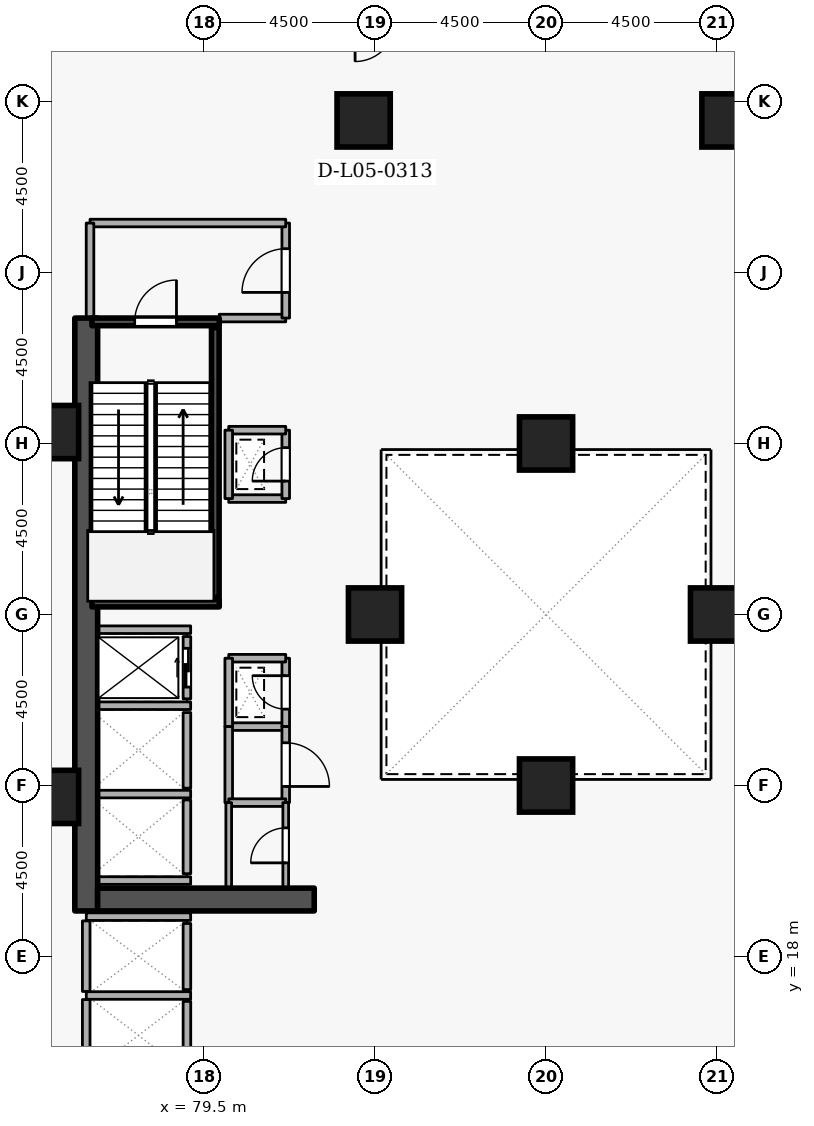
"""IFC4 building model, lengths in metres.
Left out: names, types, materials, properties, quantities, classifications, styles, units other than length and angle.
Written with IfcOpenShell. Run it as: python <this file> out.ifc"""

import sys

from ifc_helpers import new_model, si_unit, direction, frame, frame_2d, origin, origin_2d, place, context, subcontext, project, spatial, rectangle, extrude, element, fill, save


model = new_model("IFC4")
c1 = context("Model", 3, precision=1e-05, world=origin(), true_north=direction((0.0, 1.0)))
c2 = subcontext(c1, "Body", "Model", "MODEL_VIEW")
j1 = project(units=[si_unit("LENGTHUNIT", "METRE"), si_unit("PLANEANGLEUNIT", "RADIAN")], contexts=[c1])
p1 = place(None, origin())
s1 = spatial("IfcSite", under=j1, at=p1, CompositionType="ELEMENT")
p2 = place(p1, origin())
s2 = spatial("IfcBuilding", under=s1, at=p2, CompositionType="ELEMENT")
p3 = place(p2, frame((0.0, 0.0, 23.1)))
s3 = spatial("IfcBuildingStorey", under=s2, at=p3, CompositionType="ELEMENT", Elevation=23.1)
p4 = place(p3, frame((76.4, 19.2, 0.0), z_axis=(0.0, 0.0, 1.0), x_axis=(0.0, 1.0, 0.0)))
e1 = element("IfcWall", 1, at=p4, inside=s3, PredefinedType="SHEAR", context=c2, shape_type="SweptSolid", body=[
    extrude(rectangle(XDim=15.6, YDim=0.6, at=frame_2d((7.8, 0.0))), origin(), (0.0, 0.0, 1.0), 4.8),
])
p5 = place(p3, frame((76.7, 19.5, 0.0), z_axis=(0.0, 0.0, 1.0), x_axis=(1.0, 0.0, 0.0)))
e2 = element("IfcWall", 2, at=p5, inside=s3, PredefinedType="SHEAR", context=c2, shape_type="SweptSolid", body=[
    extrude(rectangle(XDim=5.7, YDim=0.6, at=frame_2d((2.85, 0.0))), origin(), (0.0, 0.0, 1.0), 4.8),
])
for number, where, z_axis, x_axis in (
    (3, (93.3, 40.0, 0.0), (0.0, 0.0, 1.0), (1.0, 0.0, 0.0)),
    (4, (83.7, 40.0, 0.0), (0.0, 0.0, 1.0), (1.0, 0.0, 0.0)),
    (5, (75.5, 22.2, 0.0), (0.0, 0.0, 1.0), (1.0, 0.0, 0.0)),
    (6, (75.5, 31.8, 0.0), (0.0, 0.0, 1.0), (1.0, 0.0, 0.0)),
    (7, (93.0, 27.0, 0.0), (0.0, 0.0, 1.0), (1.0, 0.0, 0.0)),
    (8, (84.0, 27.0, 0.0), (0.0, 0.0, 1.0), (1.0, 0.0, 0.0)),
    (9, (88.5, 22.5, 0.0), (0.0, 0.0, 1.0), (1.0, 0.0, 0.0)),
    (10, (88.5, 31.5, 0.0), (0.0, 0.0, 1.0), (1.0, 0.0, 0.0)),
):
    element("IfcColumn", number, at=place(p3, frame(where, z_axis=z_axis, x_axis=x_axis)), inside=s3, PredefinedType="COLUMN", context=c2, shape_type="SweptSolid", body=[
        extrude(rectangle(XDim=1.4, YDim=1.4, at=origin_2d()), origin(), (0.0, 0.0, 1.0), 4.8),
    ])
p6 = place(p3, frame((79.05, 24.78, 0.0), z_axis=(0.0, 0.0, 1.0), x_axis=(0.0, 1.0, 0.0)))
e11 = element("IfcWall", 11, at=p6, inside=s3, PredefinedType="STANDARD", context=c2, shape_type="SweptSolid", body=[
    extrude(rectangle(XDim=1.64, YDim=0.2, at=frame_2d((0.82, 0.0))), origin(), (0.0, 0.0, 1.0), 4.54),
])
p7 = place(p6, frame((0.31, 0.0, 0.0)))
e12 = element("IfcOpeningElement", 12, at=p7, cuts=e11, PredefinedType="OPENING", context=c2, shape_type="SweptSolid", body=[
    extrude(rectangle(XDim=1.02, YDim=2.06, at=frame_2d((0.51, 1.03))), frame((0.0, 0.11, 0.0), z_axis=(0.0, -1.0, 0.0), x_axis=(1.0, 0.0, 0.0)), (0.0, 0.0, 1.0), 0.22),
])
p8 = place(p3, frame((79.05, 22.43, 0.0), z_axis=(0.0, 0.0, 1.0), x_axis=(0.0, 1.0, 0.0)))
e13 = element("IfcWall", 13, at=p8, inside=s3, PredefinedType="STANDARD", context=c2, shape_type="SweptSolid", body=[
    extrude(rectangle(XDim=1.99, YDim=0.2, at=frame_2d((0.995, 0.0))), origin(), (0.0, 0.0, 1.0), 4.54),
])
p9 = place(p3, frame((79.05, 20.18, 0.0), z_axis=(0.0, 0.0, 1.0), x_axis=(0.0, 1.0, 0.0)))
e14 = element("IfcWall", 14, at=p9, inside=s3, PredefinedType="STANDARD", context=c2, shape_type="SweptSolid", body=[
    extrude(rectangle(XDim=1.94, YDim=0.2, at=frame_2d((0.97, 0.0))), origin(), (0.0, 0.0, 1.0), 4.54),
])
p10 = place(p3, frame((79.05, 17.13, 0.0), z_axis=(0.0, 0.0, 1.0), x_axis=(0.0, 1.0, 0.0)))
e15 = element("IfcWall", 15, at=p10, inside=s3, PredefinedType="STANDARD", context=c2, shape_type="SweptSolid", body=[
    extrude(rectangle(XDim=1.74, YDim=0.2, at=frame_2d((0.87, 0.0))), origin(), (0.0, 0.0, 1.0), 4.54),
])
p11 = place(p3, frame((79.05, 15.03, 0.0), z_axis=(0.0, 0.0, 1.0), x_axis=(0.0, 1.0, 0.0)))
e16 = element("IfcWall", 16, at=p11, inside=s3, PredefinedType="STANDARD", context=c2, shape_type="SweptSolid", body=[
    extrude(rectangle(XDim=1.79, YDim=0.2, at=frame_2d((0.895, 0.0))), origin(), (0.0, 0.0, 1.0), 4.54),
])
for number, where, z_axis, x_axis in (
    (17, (76.712, 26.6, 0.0), (0.0, 0.0, 1.0), (1.0, 0.0, 0.0)),
    (18, (76.712, 24.6, 0.0), (0.0, 0.0, 1.0), (1.0, 0.0, 0.0)),
    (19, (76.712, 22.275, 0.0), (0.0, 0.0, 1.0), (1.0, 0.0, 0.0)),
    (20, (76.712, 20.0, 0.0), (0.0, 0.0, 1.0), (1.0, 0.0, 0.0)),
):
    element("IfcWall", number, at=place(p3, frame(where, z_axis=z_axis, x_axis=x_axis)), inside=s3, PredefinedType="STANDARD", context=c2, shape_type="SweptSolid", body=[
        extrude(rectangle(XDim=2.436, YDim=0.2, at=frame_2d((1.218, 0.0))), origin(), (0.0, 0.0, 1.0), 4.54),
    ])
p12 = place(p3, frame((76.402, 19.05, 0.0), z_axis=(0.0, 0.0, 1.0), x_axis=(1.0, 0.0, 0.0)))
e21 = element("IfcWall", 21, at=p12, inside=s3, PredefinedType="STANDARD", context=c2, shape_type="SweptSolid", body=[
    extrude(rectangle(XDim=2.746, YDim=0.2, at=frame_2d((1.373, 0.0))), origin(), (0.0, 0.0, 1.0), 3.745),
])
p13 = place(p3, frame((76.402, 16.975, 0.0), z_axis=(0.0, 0.0, 1.0), x_axis=(1.0, 0.0, 0.0)))
e22 = element("IfcWall", 22, at=p13, inside=s3, PredefinedType="STANDARD", context=c2, shape_type="SweptSolid", body=[
    extrude(rectangle(XDim=2.746, YDim=0.2, at=frame_2d((1.373, 0.0))), origin(), (0.0, 0.0, 1.0), 4.54),
])
p14 = place(p3, frame((76.4, 14.852, 0.0), z_axis=(0.0, 0.0, 1.0), x_axis=(0.0, 1.0, 0.0)))
e23 = element("IfcWall", 23, at=p14, inside=s3, PredefinedType="STANDARD", context=c2, shape_type="SweptSolid", body=[
    extrude(rectangle(XDim=2.016, YDim=0.2, at=frame_2d((1.008, 0.0))), origin(), (0.0, 0.0, 1.0), 4.54),
])
p15 = place(p3, frame((76.4, 17.082, 0.0), z_axis=(0.0, 0.0, 1.0), x_axis=(0.0, 1.0, 0.0)))
e24 = element("IfcWall", 24, at=p15, inside=s3, PredefinedType="STANDARD", context=c2, shape_type="SweptSolid", body=[
    extrude(rectangle(XDim=1.856, YDim=0.2, at=frame_2d((0.928, 0.0))), origin(), (0.0, 0.0, 1.0), 4.54),
])
p16 = place(p3, frame((76.55, 34.7, 0.0), z_axis=(0.0, 0.0, 1.0), x_axis=(1.0, 0.0, 0.0)))
e25 = element("IfcWall", 25, at=p16, inside=s3, PredefinedType="SHEAR", context=c2, shape_type="SweptSolid", body=[
    extrude(rectangle(XDim=3.35, YDim=0.2, at=frame_2d((1.675, 0.0))), origin(), (0.0, 0.0, 1.0), 4.8),
])
p17 = place(p16, frame((1.125, 0.0, 0.0)))
e26 = element("IfcOpeningElement", 26, at=p17, cuts=e25, PredefinedType="OPENING", context=c2, shape_type="SweptSolid", body=[
    extrude(rectangle(XDim=1.1, YDim=2.1, at=frame_2d((0.55, 1.05))), frame((0.0, 0.11, 0.0), z_axis=(0.0, -1.0, 0.0), x_axis=(1.0, 0.0, 0.0)), (0.0, 0.0, 1.0), 0.22),
])
p18 = place(p3, frame((79.9, 27.3, 0.0), z_axis=(0.0, 0.0, 1.0), x_axis=(-1.0, 0.0, 0.0)))
e27 = element("IfcWall", 27, at=p18, inside=s3, PredefinedType="SHEAR", context=c2, shape_type="SweptSolid", body=[
    extrude(rectangle(XDim=3.35, YDim=0.2, at=frame_2d((1.675, 0.0))), origin(), (0.0, 0.0, 1.0), 4.8),
])
p19 = place(p3, frame((79.797, 27.45, 0.0), z_axis=(0.0, 0.0, 1.0), x_axis=(0.0, 1.0, 0.0)))
e28 = element("IfcWall", 28, at=p19, inside=s3, PredefinedType="SHEAR", context=c2, shape_type="SweptSolid", body=[
    extrude(rectangle(XDim=7.1, YDim=0.2, at=frame_2d((3.55, 0.0))), origin(), (0.0, 0.0, 1.0), 4.8),
])
p20 = place(p3, frame((79.9, 34.8, 0.0), z_axis=(0.0, 0.0, 1.0), x_axis=(1.0, 0.0, 0.0)))
e29 = element("IfcWall", 29, at=p20, inside=s3, PredefinedType="STANDARD", context=c2, shape_type="SweptSolid", body=[
    extrude(rectangle(XDim=1.75, YDim=0.2, at=frame_2d((0.875, 0.0))), origin(), (0.0, 0.0, 1.0), 3.745),
])
p21 = place(p3, frame((81.65, 34.8, 0.0), z_axis=(0.0, 0.0, 1.0), x_axis=(0.0, 1.0, 0.0)))
e30 = element("IfcWall", 30, at=p21, inside=s3, PredefinedType="STANDARD", context=c2, shape_type="SweptSolid", body=[
    extrude(rectangle(XDim=2.5, YDim=0.2, at=frame_2d((1.25, 0.0))), origin(), (0.0, 0.0, 1.0), 4.54),
])
p22 = place(p21, frame((0.675, 0.0, 0.0)))
e31 = element("IfcOpeningElement", 31, at=p22, cuts=e30, PredefinedType="OPENING", context=c2, shape_type="SweptSolid", body=[
    extrude(rectangle(XDim=1.15, YDim=2.1, at=frame_2d((0.575, 1.05))), frame((0.0, 0.11, 0.0), z_axis=(0.0, -1.0, 0.0), x_axis=(1.0, 0.0, 0.0)), (0.0, 0.0, 1.0), 0.22),
])
p23 = place(p3, frame((81.65, 37.3, 0.0), z_axis=(0.0, 0.0, 1.0), x_axis=(-1.0, 0.0, 0.0)))
e32 = element("IfcWall", 32, at=p23, inside=s3, PredefinedType="STANDARD", context=c2, shape_type="SweptSolid", body=[
    extrude(rectangle(XDim=5.15, YDim=0.2, at=frame_2d((2.575, 0.0))), origin(), (0.0, 0.0, 1.0), 4.54),
])
p24 = place(p3, frame((76.5, 37.3, 0.0), z_axis=(0.0, 0.0, 1.0), x_axis=(0.0, -1.0, 0.0)))
e33 = element("IfcWall", 33, at=p24, inside=s3, PredefinedType="STANDARD", context=c2, shape_type="SweptSolid", body=[
    extrude(rectangle(XDim=2.5, YDim=0.2, at=frame_2d((1.25, 0.0))), origin(), (0.0, 0.0, 1.0), 4.54),
])
p25 = place(p3, frame((80.15, 24.05, 0.0), z_axis=(0.0, 0.0, 1.0), x_axis=(1.0, 0.0, 0.0)))
e34 = element("IfcWall", 34, at=p25, inside=s3, PredefinedType="STANDARD", context=c2, shape_type="SweptSolid", body=[
    extrude(rectangle(XDim=1.5, YDim=0.2, at=frame_2d((0.75, 0.0))), origin(), (0.0, 0.0, 1.0), 4.54),
])
p26 = place(p3, frame((81.65, 24.05, 0.0), z_axis=(0.0, 0.0, 1.0), x_axis=(0.0, 1.0, 0.0)))
e35 = element("IfcWall", 35, at=p26, inside=s3, PredefinedType="STANDARD", context=c2, shape_type="SweptSolid", body=[
    extrude(rectangle(XDim=1.8, YDim=0.2, at=frame_2d((0.9, 0.0))), origin(), (0.0, 0.0, 1.0), 4.54),
])
p27 = place(p26, frame((0.46, 0.0, 0.0)))
e36 = element("IfcOpeningElement", 36, at=p27, cuts=e35, PredefinedType="OPENING", context=c2, shape_type="SweptSolid", body=[
    extrude(rectangle(XDim=0.88, YDim=2.04, at=frame_2d((0.44, 1.02))), frame((0.0, 0.11, 0.0), z_axis=(0.0, -1.0, 0.0), x_axis=(1.0, 0.0, 0.0)), (0.0, 0.0, 1.0), 0.22),
])
p28 = place(p3, frame((81.65, 25.85, 0.0), z_axis=(0.0, 0.0, 1.0), x_axis=(-1.0, 0.0, 0.0)))
e37 = element("IfcWall", 37, at=p28, inside=s3, PredefinedType="STANDARD", context=c2, shape_type="SweptSolid", body=[
    extrude(rectangle(XDim=1.5, YDim=0.2, at=frame_2d((0.75, 0.0))), origin(), (0.0, 0.0, 1.0), 4.54),
])
p29 = place(p3, frame((80.15, 25.85, 0.0), z_axis=(0.0, 0.0, 1.0), x_axis=(0.0, -1.0, 0.0)))
e38 = element("IfcWall", 38, at=p29, inside=s3, PredefinedType="STANDARD", context=c2, shape_type="SweptSolid", body=[
    extrude(rectangle(XDim=1.8, YDim=0.2, at=frame_2d((0.9, 0.0))), origin(), (0.0, 0.0, 1.0), 4.54),
])
p30 = place(p3, frame((80.15, 30.05, 0.0), z_axis=(0.0, 0.0, 1.0), x_axis=(1.0, 0.0, 0.0)))
e39 = element("IfcWall", 39, at=p30, inside=s3, PredefinedType="STANDARD", context=c2, shape_type="SweptSolid", body=[
    extrude(rectangle(XDim=1.5, YDim=0.2, at=frame_2d((0.75, 0.0))), origin(), (0.0, 0.0, 1.0), 4.54),
])
p31 = place(p3, frame((81.65, 30.05, 0.0), z_axis=(0.0, 0.0, 1.0), x_axis=(0.0, 1.0, 0.0)))
e40 = element("IfcWall", 40, at=p31, inside=s3, PredefinedType="STANDARD", context=c2, shape_type="SweptSolid", body=[
    extrude(rectangle(XDim=1.8, YDim=0.2, at=frame_2d((0.9, 0.0))), origin(), (0.0, 0.0, 1.0), 4.54),
])
p32 = place(p31, frame((0.46, 0.0, 0.0)))
e41 = element("IfcOpeningElement", 41, at=p32, cuts=e40, PredefinedType="OPENING", context=c2, shape_type="SweptSolid", body=[
    extrude(rectangle(XDim=0.88, YDim=2.04, at=frame_2d((0.44, 1.02))), frame((0.0, 0.11, 0.0), z_axis=(0.0, -1.0, 0.0), x_axis=(1.0, 0.0, 0.0)), (0.0, 0.0, 1.0), 0.22),
])
p33 = place(p3, frame((81.65, 31.85, 0.0), z_axis=(0.0, 0.0, 1.0), x_axis=(-1.0, 0.0, 0.0)))
e42 = element("IfcWall", 42, at=p33, inside=s3, PredefinedType="STANDARD", context=c2, shape_type="SweptSolid", body=[
    extrude(rectangle(XDim=1.5, YDim=0.2, at=frame_2d((0.75, 0.0))), origin(), (0.0, 0.0, 1.0), 4.54),
])
p34 = place(p3, frame((80.15, 31.85, 0.0), z_axis=(0.0, 0.0, 1.0), x_axis=(0.0, -1.0, 0.0)))
e43 = element("IfcWall", 43, at=p34, inside=s3, PredefinedType="STANDARD", context=c2, shape_type="SweptSolid", body=[
    extrude(rectangle(XDim=1.8, YDim=0.2, at=frame_2d((0.9, 0.0))), origin(), (0.0, 0.0, 1.0), 4.54),
])
p35 = place(p3, frame((80.15, 22.05, 0.0), z_axis=(0.0, 0.0, 1.0), x_axis=(0.0, 1.0, 0.0)))
e44 = element("IfcWall", 44, at=p35, inside=s3, PredefinedType="STANDARD", context=c2, shape_type="SweptSolid", body=[
    extrude(rectangle(XDim=2.0, YDim=0.2, at=frame_2d((1.0, 0.0))), origin(), (0.0, 0.0, 1.0), 4.54),
])
p36 = place(p3, frame((81.65, 24.05, 0.0), z_axis=(0.0, 0.0, 1.0), x_axis=(0.0, -1.0, 0.0)))
e45 = element("IfcWall", 45, at=p36, inside=s3, PredefinedType="STANDARD", context=c2, shape_type="SweptSolid", body=[
    extrude(rectangle(XDim=2.0, YDim=0.2, at=frame_2d((1.0, 0.0))), origin(), (0.0, 0.0, 1.0), 4.54),
])
p37 = place(p36, frame((0.425, 0.0, 0.0)))
e46 = element("IfcOpeningElement", 46, at=p37, cuts=e45, PredefinedType="OPENING", context=c2, shape_type="SweptSolid", body=[
    extrude(rectangle(XDim=1.15, YDim=2.1, at=frame_2d((0.575, 1.05))), frame((0.0, 0.11, 0.0), z_axis=(0.0, -1.0, 0.0), x_axis=(1.0, 0.0, 0.0)), (0.0, 0.0, 1.0), 0.22),
])
p38 = place(p3, frame((81.65, 22.05, 0.0), z_axis=(0.0, 0.0, 1.0), x_axis=(-1.0, 0.0, 0.0)))
e47 = element("IfcWall", 47, at=p38, inside=s3, PredefinedType="STANDARD", context=c2, shape_type="SweptSolid", body=[
    extrude(rectangle(XDim=1.5, YDim=0.2, at=frame_2d((0.75, 0.0))), origin(), (0.0, 0.0, 1.0), 4.54),
])
p39 = place(p3, frame((81.65, 19.8, 0.0), z_axis=(0.0, 0.0, 1.0), x_axis=(0.0, 1.0, 0.0)))
e48 = element("IfcWall", 48, at=p39, inside=s3, PredefinedType="PARTITIONING", context=c2, shape_type="SweptSolid", body=[
    extrude(rectangle(XDim=2.25, YDim=0.15, at=frame_2d((1.125, 0.0))), origin(), (0.0, 0.0, 1.0), 4.54),
])
p40 = place(p39, frame((0.665, 0.0, 0.0)))
e49 = element("IfcOpeningElement", 49, at=p40, cuts=e48, PredefinedType="OPENING", context=c2, shape_type="SweptSolid", body=[
    extrude(rectangle(XDim=0.92, YDim=2.08, at=frame_2d((0.46, 1.04))), frame((0.0, 0.085, 0.0), z_axis=(0.0, -1.0, 0.0), x_axis=(1.0, 0.0, 0.0)), (0.0, 0.0, 1.0), 0.17),
])
p41 = place(p3, frame((80.15, 22.05, 0.0), z_axis=(0.0, 0.0, 1.0), x_axis=(0.0, -1.0, 0.0)))
e50 = element("IfcWall", 50, at=p41, inside=s3, PredefinedType="PARTITIONING", context=c2, shape_type="SweptSolid", body=[
    extrude(rectangle(XDim=2.25, YDim=0.15, at=frame_2d((1.125, 0.0))), origin(), (0.0, 0.0, 1.0), 4.54),
])
p42 = place(p7, origin())
e51 = element("IfcDoor", 51, at=p42, inside=s3, OperationType="SLIDING_TO_LEFT", PredefinedType="DOOR", context=c2, shape_type="SweptSolid", body=[
    extrude(rectangle(XDim=1.02, YDim=2.06, at=frame_2d((0.51, 1.03))), frame((0.0, 0.025, 0.0), z_axis=(0.0, -1.0, 0.0), x_axis=(1.0, 0.0, 0.0)), (0.0, 0.0, 1.0), 0.05),
])
fill(e12, e51)
p43 = place(p17, origin())
e52 = element("IfcDoor", 52, at=p43, inside=s3, OperationType="SINGLE_SWING_RIGHT", PredefinedType="DOOR", context=c2, shape_type="SweptSolid", body=[
    extrude(rectangle(XDim=1.1, YDim=2.1, at=frame_2d((0.55, 1.05))), frame((0.0, 0.025, 0.0), z_axis=(0.0, -1.0, 0.0), x_axis=(1.0, 0.0, 0.0)), (0.0, 0.0, 1.0), 0.05),
])
fill(e26, e52)
p44 = place(p22, origin())
e53 = element("IfcDoor", 53, at=p44, inside=s3, OperationType="SINGLE_SWING_LEFT", PredefinedType="DOOR", context=c2, shape_type="SweptSolid", body=[
    extrude(rectangle(XDim=1.15, YDim=2.1, at=frame_2d((0.575, 1.05))), frame((0.0, 0.025, 0.0), z_axis=(0.0, -1.0, 0.0), x_axis=(1.0, 0.0, 0.0)), (0.0, 0.0, 1.0), 0.05),
])
fill(e31, e53)
p45 = place(p27, origin())
e54 = element("IfcDoor", 54, at=p45, inside=s3, OperationType="SINGLE_SWING_RIGHT", PredefinedType="DOOR", context=c2, shape_type="SweptSolid", body=[
    extrude(rectangle(XDim=0.88, YDim=2.04, at=frame_2d((0.44, 1.02))), frame((0.0, 0.025, 0.0), z_axis=(0.0, -1.0, 0.0), x_axis=(1.0, 0.0, 0.0)), (0.0, 0.0, 1.0), 0.05),
])
fill(e36, e54)
p46 = place(p32, origin())
e55 = element("IfcDoor", 55, at=p46, inside=s3, OperationType="SINGLE_SWING_LEFT", PredefinedType="DOOR", context=c2, shape_type="SweptSolid", body=[
    extrude(rectangle(XDim=0.88, YDim=2.04, at=frame_2d((0.44, 1.02))), frame((0.0, 0.025, 0.0), z_axis=(0.0, -1.0, 0.0), x_axis=(1.0, 0.0, 0.0)), (0.0, 0.0, 1.0), 0.05),
])
fill(e41, e55)
p47 = place(p40, origin())
e56 = element("IfcDoor", 56, at=p47, inside=s3, OperationType="SINGLE_SWING_LEFT", PredefinedType="DOOR", context=c2, shape_type="SweptSolid", body=[
    extrude(rectangle(XDim=0.92, YDim=2.08, at=frame_2d((0.46, 1.04))), frame((0.0, 0.025, 0.0), z_axis=(0.0, -1.0, 0.0), x_axis=(1.0, 0.0, 0.0)), (0.0, 0.0, 1.0), 0.05),
])
fill(e49, e56)
p48 = place(p37, origin())
e57 = element("IfcDoor", 57, at=p48, inside=s3, OperationType="SINGLE_SWING_RIGHT", PredefinedType="DOOR", context=c2, shape_type="SweptSolid", body=[
    extrude(rectangle(XDim=1.15, YDim=2.1, at=frame_2d((0.575, 1.05))), frame((0.0, 0.025, 0.0), z_axis=(0.0, -1.0, 0.0), x_axis=(1.0, 0.0, 0.0)), (0.0, 0.0, 1.0), 0.05),
])
fill(e46, e57)
save(model, sys.argv[1])
